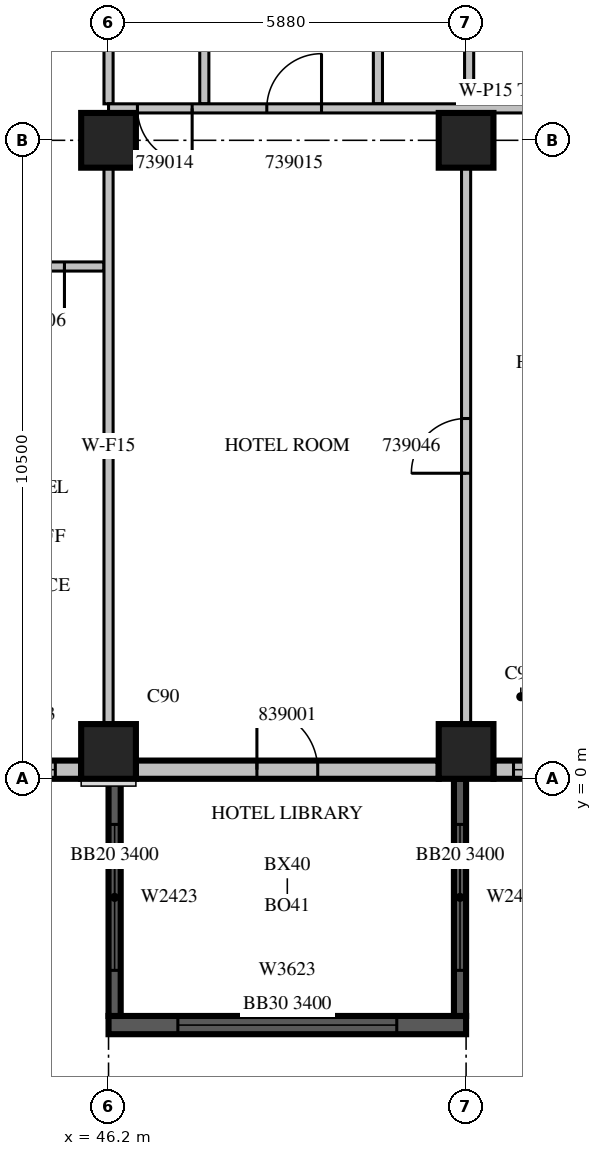
"""IFC4 building model, lengths in metres.
Left out: names, types, materials, properties, quantities, classifications, styles, units other than length and angle.
Written with IfcOpenShell. Run it as: python <this file> out.ifc"""

import sys

from ifc_helpers import new_model, si_unit, direction, frame, frame_2d, origin, origin_2d, place, context, subcontext, project, spatial, rectangle, extrude, source, transform, mapped, element, fill, save


model = new_model("IFC4")
c1 = context("Model", 3, precision=1e-05, world=origin(), true_north=direction((0.0, 1.0)))
c2 = subcontext(c1, "Body", "Model", "MODEL_VIEW")
j1 = project(units=[si_unit("LENGTHUNIT", "METRE"), si_unit("PLANEANGLEUNIT", "RADIAN")], contexts=[c1])
p1 = place(None, origin())
s1 = spatial("IfcSite", under=j1, at=p1, CompositionType="ELEMENT")
p2 = place(p1, origin())
s2 = spatial("IfcBuilding", under=s1, at=p2, CompositionType="ELEMENT")
p3 = place(p2, frame((0.0, 0.0, 181.6)))
s3 = spatial("IfcBuildingStorey", under=s2, at=p3, CompositionType="ELEMENT", Elevation=181.6)
m1 = source(origin(), c2, "Body", "SweptSolid", [
    extrude(rectangle(XDim=0.9, YDim=0.9, at=origin_2d()), origin(), (0.0, 0.0, 1.0), 3.8),
])
for number, where, z_axis, x_axis in (
    (1, (46.2, 0.45, 0.0), (0.0, 0.0, 1.0), (1.0, 0.0, 0.0)),
    (2, (52.08, 0.45, 0.0), (0.0, 0.0, 1.0), (1.0, 0.0, 0.0)),
    (3, (46.2, 10.5, 0.0), (0.0, 0.0, 1.0), (1.0, 0.0, 0.0)),
    (4, (52.08, 10.5, 0.0), (0.0, 0.0, 1.0), (1.0, 0.0, 0.0)),
):
    element("IfcColumn", number, at=place(p3, frame(where, z_axis=z_axis, x_axis=x_axis)), inside=s3, PredefinedType="COLUMN", context=c2, shape_type="MappedRepresentation", body=[
        mapped(m1, transform((0.0, 0.0, 0.0), scale=1.0)),
    ])
p4 = place(p3, frame((46.2, -4.05, 0.0), z_axis=(0.0, 0.0, 1.0), x_axis=(1.0, 0.0, 0.0)))
e5 = element("IfcWall", 5, at=p4, inside=s3, PredefinedType="SOLIDWALL", context=c2, shape_type="SweptSolid", body=[
    extrude(rectangle(XDim=5.88, YDim=0.3, at=frame_2d((2.94, 0.0))), origin(), (0.0, 0.0, 1.0), 3.4),
])
m2 = source(origin(), c2, "Body", "SweptSolid", [
    extrude(rectangle(XDim=3.6, YDim=2.3, at=frame_2d((1.8, 1.15))), frame((0.0, 0.16, 0.0), z_axis=(0.0, -1.0, 0.0), x_axis=(1.0, 0.0, 0.0)), (0.0, 0.0, 1.0), 0.32),
])
p5 = place(p4, frame((1.14, 0.0, 0.6)))
e6 = element("IfcOpeningElement", 6, at=p5, cuts=e5, PredefinedType="OPENING", context=c2, shape_type="MappedRepresentation", body=[
    mapped(m2, transform((0.0, 0.0, 0.0), scale=1.0)),
])
p6 = place(p3, frame((46.3, 0.0, 0.0), z_axis=(0.0, 0.0, 1.0), x_axis=(0.0, -1.0, 0.0)))
e7 = element("IfcWall", 7, at=p6, inside=s3, PredefinedType="SOLIDWALL", context=c2, shape_type="SweptSolid", body=[
    extrude(rectangle(XDim=3.9, YDim=0.2, at=frame_2d((1.95, 0.0))), origin(), (0.0, 0.0, 1.0), 3.4),
])
m3 = source(origin(), c2, "Body", "SweptSolid", [
    extrude(rectangle(XDim=2.4, YDim=2.3, at=frame_2d((1.2, 1.15))), frame((0.0, 0.11, 0.0), z_axis=(0.0, -1.0, 0.0), x_axis=(1.0, 0.0, 0.0)), (0.0, 0.0, 1.0), 0.22),
])
p7 = place(p6, frame((0.75, 0.0, 0.6)))
e8 = element("IfcOpeningElement", 8, at=p7, cuts=e7, PredefinedType="OPENING", context=c2, shape_type="MappedRepresentation", body=[
    mapped(m3, transform((0.0, 0.0, 0.0), scale=1.0)),
])
m4 = source(origin(), c2, "Body", "SweptSolid", [
    extrude(rectangle(XDim=3.9, YDim=0.2, at=frame_2d((1.95, 0.0))), origin(), (0.0, 0.0, 1.0), 3.4),
])
p8 = place(p3, frame((51.98, 0.0, 0.0), z_axis=(0.0, 0.0, 1.0), x_axis=(0.0, -1.0, 0.0)))
e9 = element("IfcWall", 9, at=p8, inside=s3, PredefinedType="SOLIDWALL", context=c2, shape_type="MappedRepresentation", body=[
    mapped(m4, transform((0.0, 0.0, 0.0), scale=1.0)),
])
p9 = place(p8, frame((0.75, 0.0, 0.6)))
e10 = element("IfcOpeningElement", 10, at=p9, cuts=e9, PredefinedType="OPENING", context=c2, shape_type="MappedRepresentation", body=[
    mapped(m3, transform((0.0, 0.0, 0.0), scale=1.0)),
])
m5 = source(origin(), c2, "Body", "SweptSolid", [
    extrude(rectangle(XDim=1.75, YDim=0.3, at=frame_2d((0.875, 0.0))), origin(), (0.0, 0.0, 1.0), 3.4),
])
p10 = place(p3, frame((44.0, 0.15, 0.0), z_axis=(0.0, 0.0, 1.0), x_axis=(1.0, 0.0, 0.0)))
e11 = element("IfcWall", 11, at=p10, inside=s3, PredefinedType="STANDARD", context=c2, shape_type="MappedRepresentation", body=[
    mapped(m5, transform((0.0, 0.0, 0.0), scale=1.0)),
])
m6 = source(origin(), c2, "Body", "SweptSolid", [
    extrude(rectangle(XDim=0.9, YDim=2.3, at=frame_2d((0.45, 1.15))), frame((0.0, 0.16, 0.0), z_axis=(0.0, -1.0, 0.0), x_axis=(1.0, 0.0, 0.0)), (0.0, 0.0, 1.0), 0.32),
])
p11 = place(p10, frame((0.425, 0.0, 0.6)))
e12 = element("IfcOpeningElement", 12, at=p11, cuts=e11, PredefinedType="OPENING", context=c2, shape_type="MappedRepresentation", body=[
    mapped(m6, transform((0.0, 0.0, 0.0), scale=1.0)),
])
m7 = source(origin(), c2, "Body", "SweptSolid", [
    extrude(rectangle(XDim=4.98, YDim=0.3, at=frame_2d((2.49, 0.0))), origin(), (0.0, 0.0, 1.0), 3.4),
])
p12 = place(p3, frame((46.65, 0.15, 0.0), z_axis=(0.0, 0.0, 1.0), x_axis=(1.0, 0.0, 0.0)))
e13 = element("IfcWall", 13, at=p12, inside=s3, PredefinedType="STANDARD", context=c2, shape_type="MappedRepresentation", body=[
    mapped(m7, transform((0.0, 0.0, 0.0), scale=1.0)),
])
m8 = source(origin(), c2, "Body", "SweptSolid", [
    extrude(rectangle(XDim=1.0, YDim=2.1, at=frame_2d((0.5, 1.05))), frame((0.0, 0.16, 0.0), z_axis=(0.0, -1.0, 0.0), x_axis=(1.0, 0.0, 0.0)), (0.0, 0.0, 1.0), 0.32),
])
p13 = place(p12, frame((1.99, 0.0, 0.0)))
e14 = element("IfcOpeningElement", 14, at=p13, cuts=e13, PredefinedType="OPENING", context=c2, shape_type="MappedRepresentation", body=[
    mapped(m8, transform((0.0, 0.0, 0.0), scale=1.0)),
])
m9 = source(origin(), c2, "Body", "SweptSolid", [
    extrude(rectangle(XDim=2.91, YDim=0.3, at=frame_2d((1.455, 0.0))), origin(), (0.0, 0.0, 1.0), 3.4),
])
p14 = place(p3, frame((52.53, 0.15, 0.0), z_axis=(0.0, 0.0, 1.0), x_axis=(1.0, 0.0, 0.0)))
e15 = element("IfcWall", 15, at=p14, inside=s3, PredefinedType="STANDARD", context=c2, shape_type="MappedRepresentation", body=[
    mapped(m9, transform((0.0, 0.0, 0.0), scale=1.0)),
])
m10 = source(origin(), c2, "Body", "SweptSolid", [
    extrude(rectangle(XDim=1.8, YDim=2.3, at=frame_2d((0.9, 1.15))), frame((0.0, 0.16, 0.0), z_axis=(0.0, -1.0, 0.0), x_axis=(1.0, 0.0, 0.0)), (0.0, 0.0, 1.0), 0.32),
])
p15 = place(p14, frame((0.33, 0.0, 0.6)))
e16 = element("IfcOpeningElement", 16, at=p15, cuts=e15, PredefinedType="OPENING", context=c2, shape_type="MappedRepresentation", body=[
    mapped(m10, transform((0.0, 0.0, 0.0), scale=1.0)),
])
m11 = source(origin(), c2, "Body", "SweptSolid", [
    extrude(rectangle(XDim=2.2, YDim=0.15, at=frame_2d((1.1, 0.0))), origin(), (0.0, 0.0, 1.0), 3.4),
])
p16 = place(p3, frame((46.125, 8.425, 0.0), z_axis=(0.0, 0.0, 1.0), x_axis=(-1.0, 0.0, 0.0)))
e17 = element("IfcWall", 17, at=p16, inside=s3, PredefinedType="PARTITIONING", context=c2, shape_type="MappedRepresentation", body=[
    mapped(m11, transform((0.0, 0.0, 0.0), scale=1.0)),
])
m12 = source(origin(), c2, "Body", "SweptSolid", [
    extrude(rectangle(XDim=0.9, YDim=2.1, at=frame_2d((0.45, 1.05))), frame((0.0, 0.085, 0.0), z_axis=(0.0, -1.0, 0.0), x_axis=(1.0, 0.0, 0.0)), (0.0, 0.0, 1.0), 0.17),
])
p17 = place(p16, frame((0.65, 0.0, 0.0)))
e18 = element("IfcOpeningElement", 18, at=p17, cuts=e17, PredefinedType="OPENING", context=c2, shape_type="MappedRepresentation", body=[
    mapped(m12, transform((0.0, 0.0, 0.0), scale=1.0)),
])
m13 = source(origin(), c2, "Body", "SweptSolid", [
    extrude(rectangle(XDim=9.152, YDim=0.15, at=frame_2d((4.576, 0.0))), origin(), (0.0, 0.0, 1.0), 3.4),
])
p18 = place(p3, frame((52.08, 0.899, 0.0), z_axis=(0.0, 0.0, 1.0), x_axis=(0.0, 1.0, 0.0)))
e19 = element("IfcWall", 19, at=p18, inside=s3, PredefinedType="PARTITIONING", context=c2, shape_type="MappedRepresentation", body=[
    mapped(m13, transform((0.0, 0.0, 0.0), scale=1.0)),
])
p19 = place(p18, frame((4.126, 0.0, 0.0)))
e20 = element("IfcOpeningElement", 20, at=p19, cuts=e19, PredefinedType="OPENING", context=c2, shape_type="MappedRepresentation", body=[
    mapped(m12, transform((0.0, 0.0, 0.0), scale=1.0)),
])
m14 = source(origin(), c2, "Body", "SweptSolid", [
    extrude(rectangle(XDim=3.9, YDim=0.15, at=frame_2d((1.95, 0.0))), origin(), (0.0, 0.0, 1.0), 3.4),
])
for number, where, z_axis, x_axis in (
    (21, (47.775, 11.1, 0.0), (0.0, 0.0, 1.0), (0.0, 1.0, 0.0)),
    (22, (50.63, 11.1, 0.0), (0.0, 0.0, 1.0), (0.0, 1.0, 0.0)),
    (23, (52.13, 11.1, 0.0), (0.0, 0.0, 1.0), (0.0, 1.0, 0.0)),
):
    element("IfcWall", number, at=place(p3, frame(where, z_axis=z_axis, x_axis=x_axis)), inside=s3, PredefinedType="PARTITIONING", context=c2, shape_type="MappedRepresentation", body=[
        mapped(m14, transform((0.0, 0.0, 0.0), scale=1.0)),
    ])
p20 = place(p3, frame((46.2, 0.899, 0.0), z_axis=(0.0, 0.0, 1.0), x_axis=(0.0, 1.0, 0.0)))
e24 = element("IfcWall", 24, at=p20, inside=s3, PredefinedType="PARTITIONING", context=c2, shape_type="MappedRepresentation", body=[
    mapped(m13, transform((0.0, 0.0, 0.0), scale=1.0)),
])
p21 = place(p3, frame((46.2, 11.1, 0.0), z_axis=(0.0, 0.0, 1.0), x_axis=(0.0, 1.0, 0.0)))
e25 = element("IfcWall", 25, at=p21, inside=s3, PredefinedType="PARTITIONING", context=c2, shape_type="MappedRepresentation", body=[
    mapped(m14, transform((0.0, 0.0, 0.0), scale=1.0)),
])
m15 = source(origin(), c2, "Body", "SweptSolid", [
    extrude(rectangle(XDim=13.14, YDim=0.15, at=frame_2d((6.57, 0.0))), origin(), (0.0, 0.0, 1.0), 3.4),
])
p22 = place(p3, frame((59.34, 11.025, 0.0), z_axis=(0.0, 0.0, 1.0), x_axis=(-1.0, 0.0, 0.0)))
e26 = element("IfcWall", 26, at=p22, inside=s3, PredefinedType="PARTITIONING", context=c2, shape_type="MappedRepresentation", body=[
    mapped(m15, transform((0.0, 0.0, 0.0), scale=1.0)),
])
p23 = place(p22, frame((11.765, 0.0, 0.0)))
e27 = element("IfcOpeningElement", 27, at=p23, cuts=e26, PredefinedType="OPENING", context=c2, shape_type="MappedRepresentation", body=[
    mapped(m12, transform((0.0, 0.0, 0.0), scale=1.0)),
])
p24 = place(p22, frame((9.637, 0.0, 0.0)))
e28 = element("IfcOpeningElement", 28, at=p24, cuts=e26, PredefinedType="OPENING", context=c2, shape_type="MappedRepresentation", body=[
    mapped(m12, transform((0.0, 0.0, 0.0), scale=1.0)),
])
p25 = place(p22, frame((5.12, 0.0, 0.0)))
e29 = element("IfcOpeningElement", 29, at=p25, cuts=e26, PredefinedType="OPENING", context=c2, shape_type="MappedRepresentation", body=[
    mapped(m12, transform((0.0, 0.0, 0.0), scale=1.0)),
])
m16 = source(origin(), c2, "Body", "SweptSolid", [
    extrude(rectangle(XDim=3.6, YDim=2.3, at=frame_2d((1.8, 1.15))), frame((0.0, 0.03, 0.0), z_axis=(0.0, -1.0, 0.0), x_axis=(1.0, 0.0, 0.0)), (0.0, 0.0, 1.0), 0.06),
])
p26 = place(p5, origin())
e30 = element("IfcWindow", 30, at=p26, inside=s3, PartitioningType="SINGLE_PANEL", PredefinedType="WINDOW", context=c2, shape_type="MappedRepresentation", body=[
    mapped(m16, transform((0.0, 0.0, 0.0), scale=1.0)),
])
fill(e6, e30)
m17 = source(origin(), c2, "Body", "SweptSolid", [
    extrude(rectangle(XDim=2.4, YDim=2.3, at=frame_2d((1.2, 1.15))), frame((0.0, 0.03, 0.0), z_axis=(0.0, -1.0, 0.0), x_axis=(1.0, 0.0, 0.0)), (0.0, 0.0, 1.0), 0.06),
])
p27 = place(p7, origin())
e31 = element("IfcWindow", 31, at=p27, inside=s3, PartitioningType="SINGLE_PANEL", PredefinedType="WINDOW", context=c2, shape_type="MappedRepresentation", body=[
    mapped(m17, transform((0.0, 0.0, 0.0), scale=1.0)),
])
fill(e8, e31)
p28 = place(p9, origin())
e32 = element("IfcWindow", 32, at=p28, inside=s3, PartitioningType="SINGLE_PANEL", PredefinedType="WINDOW", context=c2, shape_type="MappedRepresentation", body=[
    mapped(m17, transform((0.0, 0.0, 0.0), scale=1.0)),
])
fill(e10, e32)
m18 = source(origin(), c2, "Body", "SweptSolid", [
    extrude(rectangle(XDim=0.9, YDim=2.3, at=frame_2d((0.45, 1.15))), frame((0.0, 0.03, 0.0), z_axis=(0.0, -1.0, 0.0), x_axis=(1.0, 0.0, 0.0)), (0.0, 0.0, 1.0), 0.06),
])
p29 = place(p11, origin())
e33 = element("IfcWindow", 33, at=p29, inside=s3, PartitioningType="SINGLE_PANEL", PredefinedType="WINDOW", context=c2, shape_type="MappedRepresentation", body=[
    mapped(m18, transform((0.0, 0.0, 0.0), scale=1.0)),
])
fill(e12, e33)
m19 = source(origin(), c2, "Body", "SweptSolid", [
    extrude(rectangle(XDim=1.8, YDim=2.3, at=frame_2d((0.9, 1.15))), frame((0.0, 0.03, 0.0), z_axis=(0.0, -1.0, 0.0), x_axis=(1.0, 0.0, 0.0)), (0.0, 0.0, 1.0), 0.06),
])
p30 = place(p15, origin())
e34 = element("IfcWindow", 34, at=p30, inside=s3, PartitioningType="SINGLE_PANEL", PredefinedType="WINDOW", context=c2, shape_type="MappedRepresentation", body=[
    mapped(m19, transform((0.0, 0.0, 0.0), scale=1.0)),
])
fill(e16, e34)
m20 = source(origin(), c2, "Body", "SweptSolid", [
    extrude(rectangle(XDim=0.9, YDim=2.1, at=frame_2d((0.45, 1.05))), frame((0.0, 0.025, 0.0), z_axis=(0.0, -1.0, 0.0), x_axis=(1.0, 0.0, 0.0)), (0.0, 0.0, 1.0), 0.05),
])
p31 = place(p17, origin())
e35 = element("IfcDoor", 35, at=p31, inside=s3, OperationType="SINGLE_SWING_LEFT", PredefinedType="DOOR", context=c2, shape_type="MappedRepresentation", body=[
    mapped(m20, transform((0.0, 0.0, 0.0), scale=1.0)),
])
fill(e18, e35)
p32 = place(p23, origin())
e36 = element("IfcDoor", 36, at=p32, inside=s3, OperationType="SINGLE_SWING_LEFT", PredefinedType="DOOR", context=c2, shape_type="MappedRepresentation", body=[
    mapped(m20, transform((0.0, 0.0, 0.0), scale=1.0)),
])
fill(e27, e36)
p33 = place(p24, origin())
e37 = element("IfcDoor", 37, at=p33, inside=s3, OperationType="SINGLE_SWING_RIGHT", PredefinedType="DOOR", context=c2, shape_type="MappedRepresentation", body=[
    mapped(m20, transform((0.0, 0.0, 0.0), scale=1.0)),
])
fill(e28, e37)
p34 = place(p19, origin())
e38 = element("IfcDoor", 38, at=p34, inside=s3, OperationType="SINGLE_SWING_LEFT", PredefinedType="DOOR", context=c2, shape_type="MappedRepresentation", body=[
    mapped(m20, transform((0.0, 0.0, 0.0), scale=1.0)),
])
fill(e20, e38)
m21 = source(origin(), c2, "Body", "SweptSolid", [
    extrude(rectangle(XDim=1.0, YDim=2.1, at=frame_2d((0.5, 1.05))), frame((0.0, 0.025, 0.0), z_axis=(0.0, -1.0, 0.0), x_axis=(1.0, 0.0, 0.0)), (0.0, 0.0, 1.0), 0.05),
])
p35 = place(p13, origin())
e39 = element("IfcDoor", 39, at=p35, inside=s3, OperationType="SINGLE_SWING_LEFT", PredefinedType="DOOR", context=c2, shape_type="MappedRepresentation", body=[
    mapped(m21, transform((0.0, 0.0, 0.0), scale=1.0)),
])
fill(e14, e39)
save(model, sys.argv[1])
